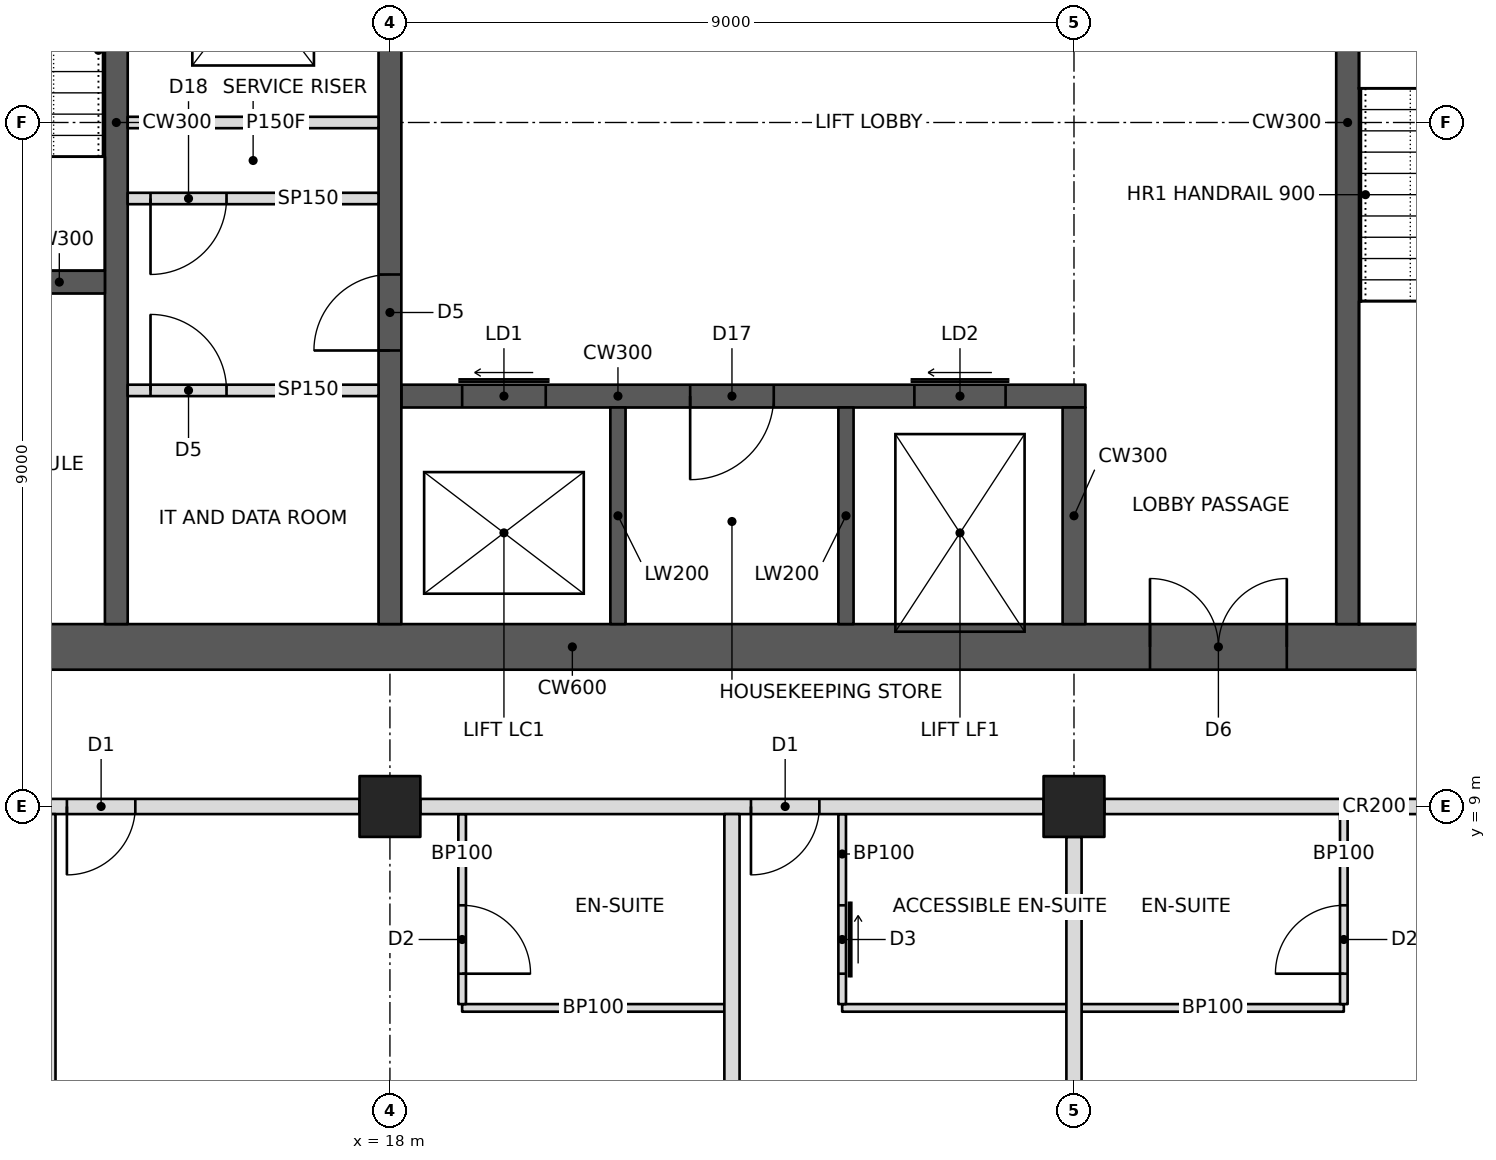
"""IFC4 building model, lengths in metres.
Left out: names, types, materials, properties, quantities, classifications, styles, units other than length and angle.
Written with IfcOpenShell. Run it as: python <this file> out.ifc"""

import sys

from ifc_helpers import new_model, si_unit, direction, frame, frame_2d, origin, origin_2d, place, context, subcontext, project, spatial, rectangle, hollow_rectangle, extrude, element, fill, save


model = new_model("IFC4")
c1 = context("Model", 3, precision=1e-05, world=origin(), true_north=direction((0.0, 1.0)))
c2 = subcontext(c1, "Body", "Model", "MODEL_VIEW")
j1 = project(units=[si_unit("LENGTHUNIT", "METRE"), si_unit("PLANEANGLEUNIT", "RADIAN")], contexts=[c1])
p1 = place(None, origin())
s1 = spatial("IfcSite", under=j1, at=p1, CompositionType="ELEMENT")
p2 = place(p1, origin())
s2 = spatial("IfcBuilding", under=s1, at=p2, CompositionType="ELEMENT")
p3 = place(p2, frame((0.0, 0.0, 230.2)))
s3 = spatial("IfcBuildingStorey", under=s2, at=p3, CompositionType="ELEMENT", Elevation=230.2)
for number, where, z_axis, x_axis in (
    (1, (18.0, 9.0, 0.0), (0.0, 0.0, 1.0), (1.0, 0.0, 0.0)),
    (2, (27.0, 9.0, 0.0), (0.0, 0.0, 1.0), (1.0, 0.0, 0.0)),
):
    element("IfcColumn", number, at=place(p3, frame(where, z_axis=z_axis, x_axis=x_axis)), inside=s3, PredefinedType="COLUMN", context=c2, shape_type="SweptSolid", body=[
        extrude(hollow_rectangle(XDim=0.8, YDim=0.8, WallThickness=0.1, at=origin_2d()), origin(), (0.0, 0.0, 1.0), 3.6),
    ])
p4 = place(p3, frame((10.8, 11.1, 0.0), z_axis=(0.0, 0.0, 1.0), x_axis=(1.0, 0.0, 0.0)))
e3 = element("IfcWall", 3, at=p4, inside=s3, PredefinedType="SHEAR", context=c2, shape_type="SweptSolid", body=[
    extrude(rectangle(XDim=23.4, YDim=0.6, at=frame_2d((11.7, 0.0))), origin(), (0.0, 0.0, 1.0), 3.6),
])
p5 = place(p4, frame((1.0, 0.0, 0.0)))
e4 = element("IfcOpeningElement", 4, at=p5, cuts=e3, PredefinedType="OPENING", context=c2, shape_type="SweptSolid", body=[
    extrude(rectangle(XDim=1.0, YDim=2.1, at=frame_2d((0.5, 1.05))), frame((0.0, 0.31, 0.0), z_axis=(0.0, -1.0, 0.0), x_axis=(1.0, 0.0, 0.0)), (0.0, 0.0, 1.0), 0.62),
])
p6 = place(p4, frame((17.2, 0.0, 0.0)))
e5 = element("IfcOpeningElement", 5, at=p6, cuts=e3, PredefinedType="OPENING", context=c2, shape_type="SweptSolid", body=[
    extrude(rectangle(XDim=1.8, YDim=2.1, at=frame_2d((0.9, 1.05))), frame((0.0, 0.31, 0.0), z_axis=(0.0, -1.0, 0.0), x_axis=(1.0, 0.0, 0.0)), (0.0, 0.0, 1.0), 0.62),
])
p7 = place(p3, frame((14.4, 11.4, 0.0), z_axis=(0.0, 0.0, 1.0), x_axis=(0.0, 1.0, 0.0)))
e6 = element("IfcWall", 6, at=p7, inside=s3, PredefinedType="SHEAR", context=c2, shape_type="SweptSolid", body=[
    extrude(rectangle(XDim=13.2, YDim=0.3, at=frame_2d((6.6, 0.0))), origin(), (0.0, 0.0, 1.0), 3.6),
])
p8 = place(p3, frame((11.4, 15.9, 0.0), z_axis=(0.0, 0.0, 1.0), x_axis=(1.0, 0.0, 0.0)))
e7 = element("IfcWall", 7, at=p8, inside=s3, PredefinedType="SHEAR", context=c2, shape_type="SweptSolid", body=[
    extrude(rectangle(XDim=2.85, YDim=0.3, at=frame_2d((1.425, 0.0))), origin(), (0.0, 0.0, 1.0), 3.6),
])
p9 = place(p8, frame((0.5, 0.0, 0.0)))
e8 = element("IfcOpeningElement", 8, at=p9, cuts=e7, PredefinedType="OPENING", context=c2, shape_type="SweptSolid", body=[
    extrude(rectangle(XDim=1.0, YDim=2.1, at=frame_2d((0.5, 1.05))), frame((0.0, 0.16, 0.0), z_axis=(0.0, -1.0, 0.0), x_axis=(1.0, 0.0, 0.0)), (0.0, 0.0, 1.0), 0.32),
])
p10 = place(p3, frame((18.0, 11.4, 0.0), z_axis=(0.0, 0.0, 1.0), x_axis=(0.0, 1.0, 0.0)))
e9 = element("IfcWall", 9, at=p10, inside=s3, PredefinedType="SHEAR", context=c2, shape_type="SweptSolid", body=[
    extrude(rectangle(XDim=13.2, YDim=0.3, at=frame_2d((6.6, 0.0))), origin(), (0.0, 0.0, 1.0), 3.6),
])
p11 = place(p10, frame((3.6, 0.0, 0.0)))
e10 = element("IfcOpeningElement", 10, at=p11, cuts=e9, PredefinedType="OPENING", context=c2, shape_type="SweptSolid", body=[
    extrude(rectangle(XDim=1.0, YDim=2.1, at=frame_2d((0.5, 1.05))), frame((0.0, 0.16, 0.0), z_axis=(0.0, -1.0, 0.0), x_axis=(1.0, 0.0, 0.0)), (0.0, 0.0, 1.0), 0.32),
])
p12 = place(p10, frame((7.85, 0.0, 0.0)))
e11 = element("IfcOpeningElement", 11, at=p12, cuts=e9, PredefinedType="OPENING", context=c2, shape_type="SweptSolid", body=[
    extrude(rectangle(XDim=1.1, YDim=2.1, at=frame_2d((0.55, 1.05))), frame((0.0, 0.16, 0.0), z_axis=(0.0, -1.0, 0.0), x_axis=(1.0, 0.0, 0.0)), (0.0, 0.0, 1.0), 0.32),
])
p13 = place(p3, frame((14.55, 18.0, 0.0), z_axis=(0.0, 0.0, 1.0), x_axis=(1.0, 0.0, 0.0)))
e12 = element("IfcWall", 12, at=p13, inside=s3, PredefinedType="PARTITIONING", context=c2, shape_type="SweptSolid", body=[
    extrude(rectangle(XDim=3.3, YDim=0.15, at=frame_2d((1.65, 0.0))), origin(), (0.0, 0.0, 1.0), 3.4),
])
p14 = place(p3, frame((18.15, 14.4, 0.0), z_axis=(0.0, 0.0, 1.0), x_axis=(1.0, 0.0, 0.0)))
e13 = element("IfcWall", 13, at=p14, inside=s3, PredefinedType="SHEAR", context=c2, shape_type="SweptSolid", body=[
    extrude(rectangle(XDim=9.0, YDim=0.3, at=frame_2d((4.5, 0.0))), origin(), (0.0, 0.0, 1.0), 3.6),
])
p15 = place(p14, frame((0.8, 0.0, 0.0)))
e14 = element("IfcOpeningElement", 14, at=p15, cuts=e13, PredefinedType="OPENING", context=c2, shape_type="SweptSolid", body=[
    extrude(rectangle(XDim=1.1, YDim=2.1, at=frame_2d((0.55, 1.05))), frame((0.0, 0.16, 0.0), z_axis=(0.0, -1.0, 0.0), x_axis=(1.0, 0.0, 0.0)), (0.0, 0.0, 1.0), 0.32),
])
p16 = place(p14, frame((6.75, 0.0, 0.0)))
e15 = element("IfcOpeningElement", 15, at=p16, cuts=e13, PredefinedType="OPENING", context=c2, shape_type="SweptSolid", body=[
    extrude(rectangle(XDim=1.2, YDim=2.1, at=frame_2d((0.6, 1.05))), frame((0.0, 0.16, 0.0), z_axis=(0.0, -1.0, 0.0), x_axis=(1.0, 0.0, 0.0)), (0.0, 0.0, 1.0), 0.32),
])
p17 = place(p14, frame((3.8, 0.0, 0.0)))
e16 = element("IfcOpeningElement", 16, at=p17, cuts=e13, PredefinedType="OPENING", context=c2, shape_type="SweptSolid", body=[
    extrude(rectangle(XDim=1.1, YDim=2.1, at=frame_2d((0.55, 1.05))), frame((0.0, 0.16, 0.0), z_axis=(0.0, -1.0, 0.0), x_axis=(1.0, 0.0, 0.0)), (0.0, 0.0, 1.0), 0.32),
])
p18 = place(p3, frame((27.0, 11.4, 0.0), z_axis=(0.0, 0.0, 1.0), x_axis=(0.0, 1.0, 0.0)))
e17 = element("IfcWall", 17, at=p18, inside=s3, PredefinedType="SHEAR", context=c2, shape_type="SweptSolid", body=[
    extrude(rectangle(XDim=2.85, YDim=0.3, at=frame_2d((1.425, 0.0))), origin(), (0.0, 0.0, 1.0), 3.6),
])
for number, where, z_axis, x_axis in (
    (18, (21.0, 11.4, 0.0), (0.0, 0.0, 1.0), (0.0, 1.0, 0.0)),
    (19, (24.0, 11.4, 0.0), (0.0, 0.0, 1.0), (0.0, 1.0, 0.0)),
):
    element("IfcWall", number, at=place(p3, frame(where, z_axis=z_axis, x_axis=x_axis)), inside=s3, PredefinedType="SHEAR", context=c2, shape_type="SweptSolid", body=[
        extrude(rectangle(XDim=2.85, YDim=0.2, at=frame_2d((1.425, 0.0))), origin(), (0.0, 0.0, 1.0), 3.6),
    ])
p19 = place(p3, frame((30.6, 11.4, 0.0), z_axis=(0.0, 0.0, 1.0), x_axis=(0.0, 1.0, 0.0)))
e20 = element("IfcWall", 20, at=p19, inside=s3, PredefinedType="SHEAR", context=c2, shape_type="SweptSolid", body=[
    extrude(rectangle(XDim=13.2, YDim=0.3, at=frame_2d((6.6, 0.0))), origin(), (0.0, 0.0, 1.0), 3.6),
])
p20 = place(p3, frame((9.4, 9.0, 0.0), z_axis=(0.0, 0.0, 1.0), x_axis=(1.0, 0.0, 0.0)))
e21 = element("IfcWall", 21, at=p20, inside=s3, PredefinedType="PARTITIONING", context=c2, shape_type="SweptSolid", body=[
    extrude(rectangle(XDim=8.2, YDim=0.2, at=frame_2d((4.1, 0.0))), origin(), (0.0, 0.0, 1.0), 2.605),
])
p21 = place(p20, frame((2.95, 0.0, 0.0)))
e22 = element("IfcOpeningElement", 22, at=p21, cuts=e21, PredefinedType="OPENING", context=c2, shape_type="SweptSolid", body=[
    extrude(rectangle(XDim=0.9, YDim=2.1, at=frame_2d((0.45, 1.05))), frame((0.0, 0.11, 0.0), z_axis=(0.0, -1.0, 0.0), x_axis=(1.0, 0.0, 0.0)), (0.0, 0.0, 1.0), 0.22),
])
p22 = place(p20, frame((4.35, 0.0, 0.0)))
e23 = element("IfcOpeningElement", 23, at=p22, cuts=e21, PredefinedType="OPENING", context=c2, shape_type="SweptSolid", body=[
    extrude(rectangle(XDim=0.9, YDim=2.1, at=frame_2d((0.45, 1.05))), frame((0.0, 0.11, 0.0), z_axis=(0.0, -1.0, 0.0), x_axis=(1.0, 0.0, 0.0)), (0.0, 0.0, 1.0), 0.22),
])
p23 = place(p3, frame((18.4, 9.0, 0.0), z_axis=(0.0, 0.0, 1.0), x_axis=(1.0, 0.0, 0.0)))
e24 = element("IfcWall", 24, at=p23, inside=s3, PredefinedType="PARTITIONING", context=c2, shape_type="SweptSolid", body=[
    extrude(rectangle(XDim=8.2, YDim=0.2, at=frame_2d((4.1, 0.0))), origin(), (0.0, 0.0, 1.0), 2.605),
])
p24 = place(p23, frame((4.35, 0.0, 0.0)))
e25 = element("IfcOpeningElement", 25, at=p24, cuts=e24, PredefinedType="OPENING", context=c2, shape_type="SweptSolid", body=[
    extrude(rectangle(XDim=0.9, YDim=2.1, at=frame_2d((0.45, 1.05))), frame((0.0, 0.11, 0.0), z_axis=(0.0, -1.0, 0.0), x_axis=(1.0, 0.0, 0.0)), (0.0, 0.0, 1.0), 0.22),
])
p25 = place(p3, frame((27.4, 9.0, 0.0), z_axis=(0.0, 0.0, 1.0), x_axis=(1.0, 0.0, 0.0)))
e26 = element("IfcWall", 26, at=p25, inside=s3, PredefinedType="PARTITIONING", context=c2, shape_type="SweptSolid", body=[
    extrude(rectangle(XDim=8.368, YDim=0.2, at=frame_2d((4.184, 0.0))), origin(), (0.0, 0.0, 1.0), 2.605),
])
p26 = place(p25, frame((7.25, 0.0, 0.0)))
e27 = element("IfcOpeningElement", 27, at=p26, cuts=e26, PredefinedType="OPENING", context=c2, shape_type="SweptSolid", body=[
    extrude(rectangle(XDim=0.9, YDim=2.1, at=frame_2d((0.45, 1.05))), frame((0.0, 0.11, 0.0), z_axis=(0.0, -1.0, 0.0), x_axis=(1.0, 0.0, 0.0)), (0.0, 0.0, 1.0), 0.22),
])
for number, where, z_axis, x_axis in (
    (28, (13.5, 8.9, 0.0), (0.0, 0.0, 1.0), (0.0, -1.0, 0.0)),
    (29, (22.5, 8.9, 0.0), (0.0, 0.0, 1.0), (0.0, -1.0, 0.0)),
):
    element("IfcWall", number, at=place(p3, frame(where, z_axis=z_axis, x_axis=x_axis)), inside=s3, PredefinedType="PARTITIONING", context=c2, shape_type="SweptSolid", body=[
        extrude(rectangle(XDim=7.9, YDim=0.2, at=frame_2d((3.95, 0.0))), origin(), (0.0, 0.0, 1.0), 2.604),
    ])
p27 = place(p3, frame((27.0, 8.6, 0.0), z_axis=(0.0, 0.0, 1.0), x_axis=(0.0, -1.0, 0.0)))
e30 = element("IfcWall", 30, at=p27, inside=s3, PredefinedType="PARTITIONING", context=c2, shape_type="SweptSolid", body=[
    extrude(rectangle(XDim=7.6, YDim=0.2, at=frame_2d((3.8, 0.0))), origin(), (0.0, 0.0, 1.0), 2.605),
])
p28 = place(p3, frame((18.95, 6.35, 0.0), z_axis=(0.0, 0.0, 1.0), x_axis=(1.0, 0.0, 0.0)))
e31 = element("IfcWall", 31, at=p28, inside=s3, PredefinedType="PARTITIONING", context=c2, shape_type="SweptSolid", body=[
    extrude(rectangle(XDim=3.45, YDim=0.1, at=frame_2d((1.725, 0.0))), origin(), (0.0, 0.0, 1.0), 3.4),
])
p29 = place(p3, frame((18.95, 8.9, 0.0), z_axis=(0.0, 0.0, 1.0), x_axis=(0.0, -1.0, 0.0)))
e32 = element("IfcWall", 32, at=p29, inside=s3, PredefinedType="PARTITIONING", context=c2, shape_type="SweptSolid", body=[
    extrude(rectangle(XDim=2.5, YDim=0.1, at=frame_2d((1.25, 0.0))), origin(), (0.0, 0.0, 1.0), 2.604),
])
p30 = place(p29, frame((1.2, 0.0, 0.0)))
e33 = element("IfcOpeningElement", 33, at=p30, cuts=e32, PredefinedType="OPENING", context=c2, shape_type="SweptSolid", body=[
    extrude(rectangle(XDim=0.9, YDim=2.1, at=frame_2d((0.45, 1.05))), frame((0.0, 0.06, 0.0), z_axis=(0.0, -1.0, 0.0), x_axis=(1.0, 0.0, 0.0)), (0.0, 0.0, 1.0), 0.12),
])
p31 = place(p3, frame((23.95, 6.35, 0.0), z_axis=(0.0, 0.0, 1.0), x_axis=(1.0, 0.0, 0.0)))
e34 = element("IfcWall", 34, at=p31, inside=s3, PredefinedType="PARTITIONING", context=c2, shape_type="SweptSolid", body=[
    extrude(rectangle(XDim=2.95, YDim=0.1, at=frame_2d((1.475, 0.0))), origin(), (0.0, 0.0, 1.0), 2.604),
])
p32 = place(p3, frame((23.95, 8.9, 0.0), z_axis=(0.0, 0.0, 1.0), x_axis=(0.0, -1.0, 0.0)))
e35 = element("IfcWall", 35, at=p32, inside=s3, PredefinedType="PARTITIONING", context=c2, shape_type="SweptSolid", body=[
    extrude(rectangle(XDim=2.5, YDim=0.1, at=frame_2d((1.25, 0.0))), origin(), (0.0, 0.0, 1.0), 2.604),
])
p33 = place(p32, frame((1.2, 0.0, 0.0)))
e36 = element("IfcOpeningElement", 36, at=p33, cuts=e35, PredefinedType="OPENING", context=c2, shape_type="SweptSolid", body=[
    extrude(rectangle(XDim=0.9, YDim=2.1, at=frame_2d((0.45, 1.05))), frame((0.0, 0.06, 0.0), z_axis=(0.0, -1.0, 0.0), x_axis=(1.0, 0.0, 0.0)), (0.0, 0.0, 1.0), 0.12),
])
p34 = place(p3, frame((27.1, 6.35, 0.0), z_axis=(0.0, 0.0, 1.0), x_axis=(1.0, 0.0, 0.0)))
e37 = element("IfcWall", 37, at=p34, inside=s3, PredefinedType="PARTITIONING", context=c2, shape_type="SweptSolid", body=[
    extrude(rectangle(XDim=3.45, YDim=0.1, at=frame_2d((1.725, 0.0))), origin(), (0.0, 0.0, 1.0), 2.604),
])
p35 = place(p3, frame((30.55, 8.9, 0.0), z_axis=(0.0, 0.0, 1.0), x_axis=(0.0, -1.0, 0.0)))
e38 = element("IfcWall", 38, at=p35, inside=s3, PredefinedType="PARTITIONING", context=c2, shape_type="SweptSolid", body=[
    extrude(rectangle(XDim=2.5, YDim=0.1, at=frame_2d((1.25, 0.0))), origin(), (0.0, 0.0, 1.0), 2.604),
])
p36 = place(p35, frame((1.2, 0.0, 0.0)))
e39 = element("IfcOpeningElement", 39, at=p36, cuts=e38, PredefinedType="OPENING", context=c2, shape_type="SweptSolid", body=[
    extrude(rectangle(XDim=0.9, YDim=2.1, at=frame_2d((0.45, 1.05))), frame((0.0, 0.06, 0.0), z_axis=(0.0, -1.0, 0.0), x_axis=(1.0, 0.0, 0.0)), (0.0, 0.0, 1.0), 0.12),
])
p37 = place(p3, frame((14.55, 17.0, 0.0), z_axis=(0.0, 0.0, 1.0), x_axis=(1.0, 0.0, 0.0)))
e40 = element("IfcWall", 40, at=p37, inside=s3, PredefinedType="PARTITIONING", context=c2, shape_type="SweptSolid", body=[
    extrude(rectangle(XDim=3.3, YDim=0.15, at=frame_2d((1.65, 0.0))), origin(), (0.0, 0.0, 1.0), 3.4),
])
p38 = place(p37, frame((0.3, 0.0, 0.0)))
e41 = element("IfcOpeningElement", 41, at=p38, cuts=e40, PredefinedType="OPENING", context=c2, shape_type="SweptSolid", body=[
    extrude(rectangle(XDim=1.0, YDim=2.1, at=frame_2d((0.5, 1.05))), frame((0.0, 0.085, 0.0), z_axis=(0.0, -1.0, 0.0), x_axis=(1.0, 0.0, 0.0)), (0.0, 0.0, 1.0), 0.17),
])
p39 = place(p3, frame((14.55, 14.475, 0.0), z_axis=(0.0, 0.0, 1.0), x_axis=(1.0, 0.0, 0.0)))
e42 = element("IfcWall", 42, at=p39, inside=s3, PredefinedType="PARTITIONING", context=c2, shape_type="SweptSolid", body=[
    extrude(rectangle(XDim=3.3, YDim=0.15, at=frame_2d((1.65, 0.0))), origin(), (0.0, 0.0, 1.0), 3.4),
])
p40 = place(p39, frame((0.3, 0.0, 0.0)))
e43 = element("IfcOpeningElement", 43, at=p40, cuts=e42, PredefinedType="OPENING", context=c2, shape_type="SweptSolid", body=[
    extrude(rectangle(XDim=1.0, YDim=2.1, at=frame_2d((0.5, 1.05))), frame((0.0, 0.085, 0.0), z_axis=(0.0, -1.0, 0.0), x_axis=(1.0, 0.0, 0.0)), (0.0, 0.0, 1.0), 0.17),
])
p41 = place(p30, origin())
e44 = element("IfcDoor", 44, at=p41, inside=s3, OperationType="SINGLE_SWING_RIGHT", PredefinedType="DOOR", context=c2, shape_type="SweptSolid", body=[
    extrude(rectangle(XDim=0.9, YDim=2.1, at=frame_2d((0.45, 1.05))), frame((0.0, 0.025, 0.0), z_axis=(0.0, -1.0, 0.0), x_axis=(1.0, 0.0, 0.0)), (0.0, 0.0, 1.0), 0.05),
])
fill(e33, e44)
p42 = place(p22, frame((0.9, 0.0, 0.0), z_axis=(0.0, 0.0, 1.0), x_axis=(-1.0, 0.0, 0.0)))
e45 = element("IfcDoor", 45, at=p42, inside=s3, OperationType="SINGLE_SWING_RIGHT", PredefinedType="DOOR", context=c2, shape_type="SweptSolid", body=[
    extrude(rectangle(XDim=0.9, YDim=2.1, at=frame_2d((0.45, 1.05))), frame((0.0, 0.025, 0.0), z_axis=(0.0, -1.0, 0.0), x_axis=(1.0, 0.0, 0.0)), (0.0, 0.0, 1.0), 0.05),
])
fill(e23, e45)
p43 = place(p33, origin())
e46 = element("IfcDoor", 46, at=p43, inside=s3, OperationType="SLIDING_TO_LEFT", PredefinedType="DOOR", context=c2, shape_type="SweptSolid", body=[
    extrude(rectangle(XDim=0.9, YDim=2.1, at=frame_2d((0.45, 1.05))), frame((0.0, 0.025, 0.0), z_axis=(0.0, -1.0, 0.0), x_axis=(1.0, 0.0, 0.0)), (0.0, 0.0, 1.0), 0.05),
])
fill(e36, e46)
p44 = place(p24, frame((0.9, 0.0, 0.0), z_axis=(0.0, 0.0, 1.0), x_axis=(-1.0, 0.0, 0.0)))
e47 = element("IfcDoor", 47, at=p44, inside=s3, OperationType="SINGLE_SWING_RIGHT", PredefinedType="DOOR", context=c2, shape_type="SweptSolid", body=[
    extrude(rectangle(XDim=0.9, YDim=2.1, at=frame_2d((0.45, 1.05))), frame((0.0, 0.025, 0.0), z_axis=(0.0, -1.0, 0.0), x_axis=(1.0, 0.0, 0.0)), (0.0, 0.0, 1.0), 0.05),
])
fill(e25, e47)
p45 = place(p36, frame((0.9, 0.0, 0.0), z_axis=(0.0, 0.0, 1.0), x_axis=(-1.0, 0.0, 0.0)))
e48 = element("IfcDoor", 48, at=p45, inside=s3, OperationType="SINGLE_SWING_LEFT", PredefinedType="DOOR", context=c2, shape_type="SweptSolid", body=[
    extrude(rectangle(XDim=0.9, YDim=2.1, at=frame_2d((0.45, 1.05))), frame((0.0, 0.025, 0.0), z_axis=(0.0, -1.0, 0.0), x_axis=(1.0, 0.0, 0.0)), (0.0, 0.0, 1.0), 0.05),
])
fill(e39, e48)
p46 = place(p38, frame((1.0, 0.0, 0.0), z_axis=(0.0, 0.0, 1.0), x_axis=(-1.0, 0.0, 0.0)))
e49 = element("IfcDoor", 49, at=p46, inside=s3, OperationType="SINGLE_SWING_RIGHT", PredefinedType="DOOR", context=c2, shape_type="SweptSolid", body=[
    extrude(rectangle(XDim=1.0, YDim=2.1, at=frame_2d((0.5, 1.05))), frame((0.0, 0.025, 0.0), z_axis=(0.0, -1.0, 0.0), x_axis=(1.0, 0.0, 0.0)), (0.0, 0.0, 1.0), 0.05),
])
fill(e41, e49)
p47 = place(p40, origin())
e50 = element("IfcDoor", 50, at=p47, inside=s3, OperationType="SINGLE_SWING_LEFT", PredefinedType="DOOR", context=c2, shape_type="SweptSolid", body=[
    extrude(rectangle(XDim=1.0, YDim=2.1, at=frame_2d((0.5, 1.05))), frame((0.0, 0.025, 0.0), z_axis=(0.0, -1.0, 0.0), x_axis=(1.0, 0.0, 0.0)), (0.0, 0.0, 1.0), 0.05),
])
fill(e43, e50)
p48 = place(p6, origin())
e51 = element("IfcDoor", 51, at=p48, inside=s3, OperationType="DOUBLE_DOOR_SINGLE_SWING", PredefinedType="DOOR", context=c2, shape_type="SweptSolid", body=[
    extrude(rectangle(XDim=1.8, YDim=2.1, at=frame_2d((0.9, 1.05))), frame((0.0, 0.025, 0.0), z_axis=(0.0, -1.0, 0.0), x_axis=(1.0, 0.0, 0.0)), (0.0, 0.0, 1.0), 0.05),
])
fill(e5, e51)
p49 = place(p11, origin())
e52 = element("IfcDoor", 52, at=p49, inside=s3, OperationType="SINGLE_SWING_LEFT", PredefinedType="DOOR", context=c2, shape_type="SweptSolid", body=[
    extrude(rectangle(XDim=1.0, YDim=2.1, at=frame_2d((0.5, 1.05))), frame((0.0, 0.025, 0.0), z_axis=(0.0, -1.0, 0.0), x_axis=(1.0, 0.0, 0.0)), (0.0, 0.0, 1.0), 0.05),
])
fill(e10, e52)
p50 = place(p15, origin())
e53 = element("IfcDoor", 53, at=p50, inside=s3, OperationType="SLIDING_TO_LEFT", PredefinedType="DOOR", context=c2, shape_type="SweptSolid", body=[
    extrude(rectangle(XDim=1.1, YDim=2.1, at=frame_2d((0.55, 1.05))), frame((0.0, 0.025, 0.0), z_axis=(0.0, -1.0, 0.0), x_axis=(1.0, 0.0, 0.0)), (0.0, 0.0, 1.0), 0.05),
])
fill(e14, e53)
p51 = place(p16, origin())
e54 = element("IfcDoor", 54, at=p51, inside=s3, OperationType="SLIDING_TO_LEFT", PredefinedType="DOOR", context=c2, shape_type="SweptSolid", body=[
    extrude(rectangle(XDim=1.2, YDim=2.1, at=frame_2d((0.6, 1.05))), frame((0.0, 0.025, 0.0), z_axis=(0.0, -1.0, 0.0), x_axis=(1.0, 0.0, 0.0)), (0.0, 0.0, 1.0), 0.05),
])
fill(e15, e54)
p52 = place(p17, frame((1.1, 0.0, 0.0), z_axis=(0.0, 0.0, 1.0), x_axis=(-1.0, 0.0, 0.0)))
e55 = element("IfcDoor", 55, at=p52, inside=s3, OperationType="SINGLE_SWING_RIGHT", PredefinedType="DOOR", context=c2, shape_type="SweptSolid", body=[
    extrude(rectangle(XDim=1.1, YDim=2.1, at=frame_2d((0.55, 1.05))), frame((0.0, 0.025, 0.0), z_axis=(0.0, -1.0, 0.0), x_axis=(1.0, 0.0, 0.0)), (0.0, 0.0, 1.0), 0.05),
])
fill(e16, e55)
save(model, sys.argv[1])
